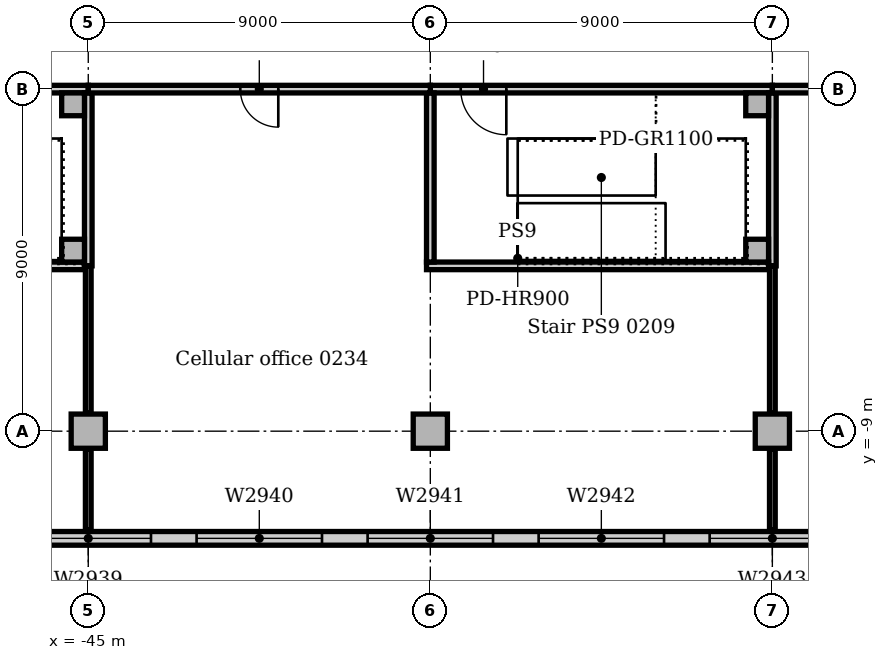
"""IFC4 building model, lengths in metres.
Left out: names, types, materials, properties, quantities, classifications, styles, units other than length and angle.
Written with IfcOpenShell. Run it as: python <this file> out.ifc"""

import sys

from ifc_helpers import new_model, si_unit, direction, frame, frame_2d, origin, origin_2d, place, context, subcontext, project, spatial, rectangle, extrude, element, fill, save


model = new_model("IFC4")
c1 = context("Model", 3, precision=1e-05, world=origin(), true_north=direction((0.0, 1.0)))
c2 = subcontext(c1, "Body", "Model", "MODEL_VIEW")
j1 = project(units=[si_unit("LENGTHUNIT", "METRE"), si_unit("PLANEANGLEUNIT", "RADIAN")], contexts=[c1])
p1 = place(None, origin())
s1 = spatial("IfcSite", under=j1, at=p1, CompositionType="ELEMENT")
p2 = place(p1, origin())
s2 = spatial("IfcBuilding", under=s1, at=p2, CompositionType="ELEMENT")
p3 = place(p2, frame((0.0, 0.0, 11.0)))
s3 = spatial("IfcBuildingStorey", under=s2, at=p3, CompositionType="ELEMENT", Elevation=11.0)
for number, where, z_axis, x_axis in (
    (1, (-45.0, -9.0, 0.0), (0.0, 0.0, 1.0), (1.0, 0.0, 0.0)),
    (2, (-36.0, -9.0, 0.0), (0.0, 0.0, 1.0), (1.0, 0.0, 0.0)),
    (3, (-27.0, -9.0, 0.0), (0.0, 0.0, 1.0), (1.0, 0.0, 0.0)),
):
    element("IfcColumn", number, at=place(p3, frame(where, z_axis=z_axis, x_axis=x_axis)), inside=s3, PredefinedType="COLUMN", context=c2, shape_type="SweptSolid", body=[
        extrude(rectangle(XDim=0.9, YDim=0.9, at=origin_2d()), origin(), (0.0, 0.0, 1.0), 4.7),
    ])
p4 = place(p3, frame((-81.0, -11.82, 0.0), z_axis=(0.0, 0.0, 1.0), x_axis=(1.0, 0.0, 0.0)))
e4 = element("IfcWall", 4, at=p4, inside=s3, PredefinedType="STANDARD", context=c2, shape_type="SweptSolid", body=[
    extrude(rectangle(XDim=144.0, YDim=0.36, at=frame_2d((72.0, 0.0))), origin(), (0.0, 0.0, 1.0), 4.7),
])
p5 = place(p4, frame((2.85, 0.0, 0.9)))
e5 = element("IfcOpeningElement", 5, at=p5, cuts=e4, PredefinedType="OPENING", context=c2, shape_type="SweptSolid", body=[
    extrude(rectangle(XDim=3.3, YDim=2.4, at=frame_2d((1.65, 1.2))), frame((0.0, 0.19, 0.0), z_axis=(0.0, -1.0, 0.0), x_axis=(1.0, 0.0, 0.0)), (0.0, 0.0, 1.0), 0.38),
])
p6 = place(p4, frame((7.35, 0.0, 0.9)))
e6 = element("IfcOpeningElement", 6, at=p6, cuts=e4, PredefinedType="OPENING", context=c2, shape_type="SweptSolid", body=[
    extrude(rectangle(XDim=3.3, YDim=2.4, at=frame_2d((1.65, 1.2))), frame((0.0, 0.19, 0.0), z_axis=(0.0, -1.0, 0.0), x_axis=(1.0, 0.0, 0.0)), (0.0, 0.0, 1.0), 0.38),
])
p7 = place(p4, frame((11.85, 0.0, 0.9)))
e7 = element("IfcOpeningElement", 7, at=p7, cuts=e4, PredefinedType="OPENING", context=c2, shape_type="SweptSolid", body=[
    extrude(rectangle(XDim=3.3, YDim=2.4, at=frame_2d((1.65, 1.2))), frame((0.0, 0.19, 0.0), z_axis=(0.0, -1.0, 0.0), x_axis=(1.0, 0.0, 0.0)), (0.0, 0.0, 1.0), 0.38),
])
p8 = place(p4, frame((16.35, 0.0, 0.9)))
e8 = element("IfcOpeningElement", 8, at=p8, cuts=e4, PredefinedType="OPENING", context=c2, shape_type="SweptSolid", body=[
    extrude(rectangle(XDim=3.3, YDim=2.4, at=frame_2d((1.65, 1.2))), frame((0.0, 0.19, 0.0), z_axis=(0.0, -1.0, 0.0), x_axis=(1.0, 0.0, 0.0)), (0.0, 0.0, 1.0), 0.38),
])
p9 = place(p4, frame((20.85, 0.0, 0.9)))
e9 = element("IfcOpeningElement", 9, at=p9, cuts=e4, PredefinedType="OPENING", context=c2, shape_type="SweptSolid", body=[
    extrude(rectangle(XDim=3.3, YDim=2.4, at=frame_2d((1.65, 1.2))), frame((0.0, 0.19, 0.0), z_axis=(0.0, -1.0, 0.0), x_axis=(1.0, 0.0, 0.0)), (0.0, 0.0, 1.0), 0.38),
])
p10 = place(p4, frame((25.35, 0.0, 0.9)))
e10 = element("IfcOpeningElement", 10, at=p10, cuts=e4, PredefinedType="OPENING", context=c2, shape_type="SweptSolid", body=[
    extrude(rectangle(XDim=3.3, YDim=2.4, at=frame_2d((1.65, 1.2))), frame((0.0, 0.19, 0.0), z_axis=(0.0, -1.0, 0.0), x_axis=(1.0, 0.0, 0.0)), (0.0, 0.0, 1.0), 0.38),
])
p11 = place(p4, frame((29.85, 0.0, 0.9)))
e11 = element("IfcOpeningElement", 11, at=p11, cuts=e4, PredefinedType="OPENING", context=c2, shape_type="SweptSolid", body=[
    extrude(rectangle(XDim=3.3, YDim=2.4, at=frame_2d((1.65, 1.2))), frame((0.0, 0.19, 0.0), z_axis=(0.0, -1.0, 0.0), x_axis=(1.0, 0.0, 0.0)), (0.0, 0.0, 1.0), 0.38),
])
p12 = place(p4, frame((34.35, 0.0, 0.9)))
e12 = element("IfcOpeningElement", 12, at=p12, cuts=e4, PredefinedType="OPENING", context=c2, shape_type="SweptSolid", body=[
    extrude(rectangle(XDim=3.3, YDim=2.4, at=frame_2d((1.65, 1.2))), frame((0.0, 0.19, 0.0), z_axis=(0.0, -1.0, 0.0), x_axis=(1.0, 0.0, 0.0)), (0.0, 0.0, 1.0), 0.38),
])
p13 = place(p4, frame((38.85, 0.0, 0.9)))
e13 = element("IfcOpeningElement", 13, at=p13, cuts=e4, PredefinedType="OPENING", context=c2, shape_type="SweptSolid", body=[
    extrude(rectangle(XDim=3.3, YDim=2.4, at=frame_2d((1.65, 1.2))), frame((0.0, 0.19, 0.0), z_axis=(0.0, -1.0, 0.0), x_axis=(1.0, 0.0, 0.0)), (0.0, 0.0, 1.0), 0.38),
])
p14 = place(p4, frame((43.35, 0.0, 0.9)))
e14 = element("IfcOpeningElement", 14, at=p14, cuts=e4, PredefinedType="OPENING", context=c2, shape_type="SweptSolid", body=[
    extrude(rectangle(XDim=3.3, YDim=2.4, at=frame_2d((1.65, 1.2))), frame((0.0, 0.19, 0.0), z_axis=(0.0, -1.0, 0.0), x_axis=(1.0, 0.0, 0.0)), (0.0, 0.0, 1.0), 0.38),
])
p15 = place(p4, frame((47.85, 0.0, 0.9)))
e15 = element("IfcOpeningElement", 15, at=p15, cuts=e4, PredefinedType="OPENING", context=c2, shape_type="SweptSolid", body=[
    extrude(rectangle(XDim=3.3, YDim=2.4, at=frame_2d((1.65, 1.2))), frame((0.0, 0.19, 0.0), z_axis=(0.0, -1.0, 0.0), x_axis=(1.0, 0.0, 0.0)), (0.0, 0.0, 1.0), 0.38),
])
p16 = place(p4, frame((52.35, 0.0, 0.9)))
e16 = element("IfcOpeningElement", 16, at=p16, cuts=e4, PredefinedType="OPENING", context=c2, shape_type="SweptSolid", body=[
    extrude(rectangle(XDim=3.3, YDim=2.4, at=frame_2d((1.65, 1.2))), frame((0.0, 0.19, 0.0), z_axis=(0.0, -1.0, 0.0), x_axis=(1.0, 0.0, 0.0)), (0.0, 0.0, 1.0), 0.38),
])
p17 = place(p4, frame((56.85, 0.0, 0.9)))
e17 = element("IfcOpeningElement", 17, at=p17, cuts=e4, PredefinedType="OPENING", context=c2, shape_type="SweptSolid", body=[
    extrude(rectangle(XDim=3.3, YDim=2.4, at=frame_2d((1.65, 1.2))), frame((0.0, 0.19, 0.0), z_axis=(0.0, -1.0, 0.0), x_axis=(1.0, 0.0, 0.0)), (0.0, 0.0, 1.0), 0.38),
])
p18 = place(p4, frame((61.35, 0.0, 0.9)))
e18 = element("IfcOpeningElement", 18, at=p18, cuts=e4, PredefinedType="OPENING", context=c2, shape_type="SweptSolid", body=[
    extrude(rectangle(XDim=3.3, YDim=2.4, at=frame_2d((1.65, 1.2))), frame((0.0, 0.19, 0.0), z_axis=(0.0, -1.0, 0.0), x_axis=(1.0, 0.0, 0.0)), (0.0, 0.0, 1.0), 0.38),
])
p19 = place(p4, frame((65.85, 0.0, 0.9)))
e19 = element("IfcOpeningElement", 19, at=p19, cuts=e4, PredefinedType="OPENING", context=c2, shape_type="SweptSolid", body=[
    extrude(rectangle(XDim=3.3, YDim=2.4, at=frame_2d((1.65, 1.2))), frame((0.0, 0.19, 0.0), z_axis=(0.0, -1.0, 0.0), x_axis=(1.0, 0.0, 0.0)), (0.0, 0.0, 1.0), 0.38),
])
p20 = place(p4, frame((70.35, 0.0, 0.9)))
e20 = element("IfcOpeningElement", 20, at=p20, cuts=e4, PredefinedType="OPENING", context=c2, shape_type="SweptSolid", body=[
    extrude(rectangle(XDim=3.3, YDim=2.4, at=frame_2d((1.65, 1.2))), frame((0.0, 0.19, 0.0), z_axis=(0.0, -1.0, 0.0), x_axis=(1.0, 0.0, 0.0)), (0.0, 0.0, 1.0), 0.38),
])
p21 = place(p4, frame((74.85, 0.0, 0.9)))
e21 = element("IfcOpeningElement", 21, at=p21, cuts=e4, PredefinedType="OPENING", context=c2, shape_type="SweptSolid", body=[
    extrude(rectangle(XDim=3.3, YDim=2.4, at=frame_2d((1.65, 1.2))), frame((0.0, 0.19, 0.0), z_axis=(0.0, -1.0, 0.0), x_axis=(1.0, 0.0, 0.0)), (0.0, 0.0, 1.0), 0.38),
])
p22 = place(p4, frame((79.35, 0.0, 0.9)))
e22 = element("IfcOpeningElement", 22, at=p22, cuts=e4, PredefinedType="OPENING", context=c2, shape_type="SweptSolid", body=[
    extrude(rectangle(XDim=3.3, YDim=2.4, at=frame_2d((1.65, 1.2))), frame((0.0, 0.19, 0.0), z_axis=(0.0, -1.0, 0.0), x_axis=(1.0, 0.0, 0.0)), (0.0, 0.0, 1.0), 0.38),
])
p23 = place(p4, frame((83.85, 0.0, 0.9)))
e23 = element("IfcOpeningElement", 23, at=p23, cuts=e4, PredefinedType="OPENING", context=c2, shape_type="SweptSolid", body=[
    extrude(rectangle(XDim=3.3, YDim=2.4, at=frame_2d((1.65, 1.2))), frame((0.0, 0.19, 0.0), z_axis=(0.0, -1.0, 0.0), x_axis=(1.0, 0.0, 0.0)), (0.0, 0.0, 1.0), 0.38),
])
p24 = place(p4, frame((88.35, 0.0, 0.9)))
e24 = element("IfcOpeningElement", 24, at=p24, cuts=e4, PredefinedType="OPENING", context=c2, shape_type="SweptSolid", body=[
    extrude(rectangle(XDim=3.3, YDim=2.4, at=frame_2d((1.65, 1.2))), frame((0.0, 0.19, 0.0), z_axis=(0.0, -1.0, 0.0), x_axis=(1.0, 0.0, 0.0)), (0.0, 0.0, 1.0), 0.38),
])
p25 = place(p4, frame((92.85, 0.0, 0.9)))
e25 = element("IfcOpeningElement", 25, at=p25, cuts=e4, PredefinedType="OPENING", context=c2, shape_type="SweptSolid", body=[
    extrude(rectangle(XDim=3.3, YDim=2.4, at=frame_2d((1.65, 1.2))), frame((0.0, 0.19, 0.0), z_axis=(0.0, -1.0, 0.0), x_axis=(1.0, 0.0, 0.0)), (0.0, 0.0, 1.0), 0.38),
])
p26 = place(p4, frame((97.35, 0.0, 0.9)))
e26 = element("IfcOpeningElement", 26, at=p26, cuts=e4, PredefinedType="OPENING", context=c2, shape_type="SweptSolid", body=[
    extrude(rectangle(XDim=3.3, YDim=2.4, at=frame_2d((1.65, 1.2))), frame((0.0, 0.19, 0.0), z_axis=(0.0, -1.0, 0.0), x_axis=(1.0, 0.0, 0.0)), (0.0, 0.0, 1.0), 0.38),
])
p27 = place(p4, frame((101.85, 0.0, 0.9)))
e27 = element("IfcOpeningElement", 27, at=p27, cuts=e4, PredefinedType="OPENING", context=c2, shape_type="SweptSolid", body=[
    extrude(rectangle(XDim=3.3, YDim=2.4, at=frame_2d((1.65, 1.2))), frame((0.0, 0.19, 0.0), z_axis=(0.0, -1.0, 0.0), x_axis=(1.0, 0.0, 0.0)), (0.0, 0.0, 1.0), 0.38),
])
p28 = place(p4, frame((106.35, 0.0, 0.9)))
e28 = element("IfcOpeningElement", 28, at=p28, cuts=e4, PredefinedType="OPENING", context=c2, shape_type="SweptSolid", body=[
    extrude(rectangle(XDim=3.3, YDim=2.4, at=frame_2d((1.65, 1.2))), frame((0.0, 0.19, 0.0), z_axis=(0.0, -1.0, 0.0), x_axis=(1.0, 0.0, 0.0)), (0.0, 0.0, 1.0), 0.38),
])
p29 = place(p4, frame((110.85, 0.0, 0.9)))
e29 = element("IfcOpeningElement", 29, at=p29, cuts=e4, PredefinedType="OPENING", context=c2, shape_type="SweptSolid", body=[
    extrude(rectangle(XDim=3.3, YDim=2.4, at=frame_2d((1.65, 1.2))), frame((0.0, 0.19, 0.0), z_axis=(0.0, -1.0, 0.0), x_axis=(1.0, 0.0, 0.0)), (0.0, 0.0, 1.0), 0.38),
])
p30 = place(p4, frame((115.35, 0.0, 0.9)))
e30 = element("IfcOpeningElement", 30, at=p30, cuts=e4, PredefinedType="OPENING", context=c2, shape_type="SweptSolid", body=[
    extrude(rectangle(XDim=3.3, YDim=2.4, at=frame_2d((1.65, 1.2))), frame((0.0, 0.19, 0.0), z_axis=(0.0, -1.0, 0.0), x_axis=(1.0, 0.0, 0.0)), (0.0, 0.0, 1.0), 0.38),
])
p31 = place(p4, frame((119.85, 0.0, 0.9)))
e31 = element("IfcOpeningElement", 31, at=p31, cuts=e4, PredefinedType="OPENING", context=c2, shape_type="SweptSolid", body=[
    extrude(rectangle(XDim=3.3, YDim=2.4, at=frame_2d((1.65, 1.2))), frame((0.0, 0.19, 0.0), z_axis=(0.0, -1.0, 0.0), x_axis=(1.0, 0.0, 0.0)), (0.0, 0.0, 1.0), 0.38),
])
p32 = place(p4, frame((124.35, 0.0, 0.9)))
e32 = element("IfcOpeningElement", 32, at=p32, cuts=e4, PredefinedType="OPENING", context=c2, shape_type="SweptSolid", body=[
    extrude(rectangle(XDim=3.3, YDim=2.4, at=frame_2d((1.65, 1.2))), frame((0.0, 0.19, 0.0), z_axis=(0.0, -1.0, 0.0), x_axis=(1.0, 0.0, 0.0)), (0.0, 0.0, 1.0), 0.38),
])
p33 = place(p4, frame((128.85, 0.0, 0.9)))
e33 = element("IfcOpeningElement", 33, at=p33, cuts=e4, PredefinedType="OPENING", context=c2, shape_type="SweptSolid", body=[
    extrude(rectangle(XDim=3.3, YDim=2.4, at=frame_2d((1.65, 1.2))), frame((0.0, 0.19, 0.0), z_axis=(0.0, -1.0, 0.0), x_axis=(1.0, 0.0, 0.0)), (0.0, 0.0, 1.0), 0.38),
])
p34 = place(p4, frame((133.35, 0.0, 0.9)))
e34 = element("IfcOpeningElement", 34, at=p34, cuts=e4, PredefinedType="OPENING", context=c2, shape_type="SweptSolid", body=[
    extrude(rectangle(XDim=3.3, YDim=2.4, at=frame_2d((1.65, 1.2))), frame((0.0, 0.19, 0.0), z_axis=(0.0, -1.0, 0.0), x_axis=(1.0, 0.0, 0.0)), (0.0, 0.0, 1.0), 0.38),
])
p35 = place(p4, frame((137.85, 0.0, 0.9)))
e35 = element("IfcOpeningElement", 35, at=p35, cuts=e4, PredefinedType="OPENING", context=c2, shape_type="SweptSolid", body=[
    extrude(rectangle(XDim=3.3, YDim=2.4, at=frame_2d((1.65, 1.2))), frame((0.0, 0.19, 0.0), z_axis=(0.0, -1.0, 0.0), x_axis=(1.0, 0.0, 0.0)), (0.0, 0.0, 1.0), 0.38),
])
for number, where, z_axis, x_axis in (
    (36, (-45.4, -4.25, 0.0), (0.0, 0.0, 1.0), (1.0, 0.0, 0.0)),
    (37, (-45.4, -0.4, 0.0), (0.0, 0.0, 1.0), (1.0, 0.0, 0.0)),
    (38, (-27.4, -4.25, 0.0), (0.0, 0.0, 1.0), (1.0, 0.0, 0.0)),
    (39, (-27.4, -0.4, 0.0), (0.0, 0.0, 1.0), (1.0, 0.0, 0.0)),
):
    element("IfcColumn", number, at=place(p3, frame(where, z_axis=z_axis, x_axis=x_axis)), inside=s3, PredefinedType="COLUMN", context=c2, shape_type="SweptSolid", body=[
        extrude(rectangle(XDim=0.6, YDim=0.6, at=origin_2d()), origin(), (0.0, 0.0, 1.0), 5.0),
    ])
p36 = place(p3, frame((-54.0, 0.0, 0.0), z_axis=(0.0, 0.0, 1.0), x_axis=(1.0, 0.0, 0.0)))
e40 = element("IfcWall", 40, at=p36, inside=s3, PredefinedType="SOLIDWALL", context=c2, shape_type="SweptSolid", body=[
    extrude(rectangle(XDim=9.0, YDim=0.2, at=frame_2d((4.5, 0.0))), origin(), (0.0, 0.0, 1.0), 4.7),
])
p37 = place(p36, frame((0.8, 0.0, 0.0)))
e41 = element("IfcOpeningElement", 41, at=p37, cuts=e40, PredefinedType="OPENING", context=c2, shape_type="SweptSolid", body=[
    extrude(rectangle(XDim=1.2, YDim=2.1, at=frame_2d((0.6, 1.05))), frame((0.0, 0.11, 0.0), z_axis=(0.0, -1.0, 0.0), x_axis=(1.0, 0.0, 0.0)), (0.0, 0.0, 1.0), 0.22),
])
p38 = place(p3, frame((-54.1, -4.65, 0.0), z_axis=(0.0, 0.0, 1.0), x_axis=(1.0, 0.0, 0.0)))
e42 = element("IfcWall", 42, at=p38, inside=s3, PredefinedType="SOLIDWALL", context=c2, shape_type="SweptSolid", body=[
    extrude(rectangle(XDim=9.0, YDim=0.2, at=frame_2d((4.5, 0.0))), origin(), (0.0, 0.0, 1.0), 4.7),
])
p39 = place(p3, frame((-45.0, -4.65, 0.0), z_axis=(0.0, 0.0, 1.0), x_axis=(0.0, 1.0, 0.0)))
e43 = element("IfcWall", 43, at=p39, inside=s3, PredefinedType="SOLIDWALL", context=c2, shape_type="SweptSolid", body=[
    extrude(rectangle(XDim=4.55, YDim=0.2, at=frame_2d((2.275, 0.0))), origin(), (0.0, 0.0, 1.0), 4.7),
])
p40 = place(p3, frame((-36.0, 0.0, 0.0), z_axis=(0.0, 0.0, 1.0), x_axis=(1.0, 0.0, 0.0)))
e44 = element("IfcWall", 44, at=p40, inside=s3, PredefinedType="SOLIDWALL", context=c2, shape_type="SweptSolid", body=[
    extrude(rectangle(XDim=9.0, YDim=0.2, at=frame_2d((4.5, 0.0))), origin(), (0.0, 0.0, 1.0), 4.7),
])
p41 = place(p40, frame((0.8, 0.0, 0.0)))
e45 = element("IfcOpeningElement", 45, at=p41, cuts=e44, PredefinedType="OPENING", context=c2, shape_type="SweptSolid", body=[
    extrude(rectangle(XDim=1.2, YDim=2.1, at=frame_2d((0.6, 1.05))), frame((0.0, 0.11, 0.0), z_axis=(0.0, -1.0, 0.0), x_axis=(1.0, 0.0, 0.0)), (0.0, 0.0, 1.0), 0.22),
])
p42 = place(p3, frame((-27.0, -4.65, 0.0), z_axis=(0.0, 0.0, 1.0), x_axis=(0.0, 1.0, 0.0)))
e46 = element("IfcWall", 46, at=p42, inside=s3, PredefinedType="SOLIDWALL", context=c2, shape_type="SweptSolid", body=[
    extrude(rectangle(XDim=4.55, YDim=0.2, at=frame_2d((2.275, 0.0))), origin(), (0.0, 0.0, 1.0), 4.7),
])
p43 = place(p3, frame((-36.1, -4.65, 0.0), z_axis=(0.0, 0.0, 1.0), x_axis=(1.0, 0.0, 0.0)))
e47 = element("IfcWall", 47, at=p43, inside=s3, PredefinedType="SOLIDWALL", context=c2, shape_type="SweptSolid", body=[
    extrude(rectangle(XDim=9.0, YDim=0.2, at=frame_2d((4.5, 0.0))), origin(), (0.0, 0.0, 1.0), 4.7),
])
p44 = place(p3, frame((-36.0, -4.55, 0.0), z_axis=(0.0, 0.0, 1.0), x_axis=(0.0, 1.0, 0.0)))
e48 = element("IfcWall", 48, at=p44, inside=s3, PredefinedType="SOLIDWALL", context=c2, shape_type="SweptSolid", body=[
    extrude(rectangle(XDim=4.45, YDim=0.2, at=frame_2d((2.225, 0.0))), origin(), (0.0, 0.0, 1.0), 4.7),
])
p45 = place(p3, frame((-45.0, 0.0, 0.0), z_axis=(0.0, 0.0, 1.0), x_axis=(1.0, 0.0, 0.0)))
e49 = element("IfcWall", 49, at=p45, inside=s3, PredefinedType="PARTITIONING", context=c2, shape_type="SweptSolid", body=[
    extrude(rectangle(XDim=9.0, YDim=0.2, at=frame_2d((4.5, 0.0))), origin(), (0.0, 0.0, 1.0), 4.7),
])
p46 = place(p45, frame((4.0, 0.0, 0.0)))
e50 = element("IfcOpeningElement", 50, at=p46, cuts=e49, PredefinedType="OPENING", context=c2, shape_type="SweptSolid", body=[
    extrude(rectangle(XDim=1.0, YDim=2.1, at=frame_2d((0.5, 1.05))), frame((0.0, 0.11, 0.0), z_axis=(0.0, -1.0, 0.0), x_axis=(1.0, 0.0, 0.0)), (0.0, 0.0, 1.0), 0.22),
])
p47 = place(p3, frame((-27.0, 0.0, 0.0), z_axis=(0.0, 0.0, 1.0), x_axis=(1.0, 0.0, 0.0)))
e51 = element("IfcWall", 51, at=p47, inside=s3, PredefinedType="PARTITIONING", context=c2, shape_type="SweptSolid", body=[
    extrude(rectangle(XDim=8.53, YDim=0.2, at=frame_2d((4.265, 0.0))), origin(), (0.0, 0.0, 1.0), 4.7),
])
p48 = place(p47, frame((4.0, 0.0, 0.0)))
e52 = element("IfcOpeningElement", 52, at=p48, cuts=e51, PredefinedType="OPENING", context=c2, shape_type="SweptSolid", body=[
    extrude(rectangle(XDim=1.0, YDim=2.1, at=frame_2d((0.5, 1.05))), frame((0.0, 0.11, 0.0), z_axis=(0.0, -1.0, 0.0), x_axis=(1.0, 0.0, 0.0)), (0.0, 0.0, 1.0), 0.22),
])
p49 = place(p3, frame((-27.0, -11.6, 0.0), z_axis=(0.0, 0.0, 1.0), x_axis=(0.0, 1.0, 0.0)))
e53 = element("IfcWall", 53, at=p49, inside=s3, PredefinedType="PARTITIONING", context=c2, shape_type="SweptSolid", body=[
    extrude(rectangle(XDim=2.13, YDim=0.15, at=frame_2d((1.065, 0.0))), origin(), (0.0, 0.0, 1.0), 4.7),
])
p50 = place(p3, frame((-27.0, -8.53, 0.0), z_axis=(0.0, 0.0, 1.0), x_axis=(0.0, 1.0, 0.0)))
e54 = element("IfcWall", 54, at=p50, inside=s3, PredefinedType="PARTITIONING", context=c2, shape_type="SweptSolid", body=[
    extrude(rectangle(XDim=3.88, YDim=0.15, at=frame_2d((1.94, 0.0))), origin(), (0.0, 0.0, 1.0), 4.7),
])
p51 = place(p3, frame((-45.0, -11.6, 0.0), z_axis=(0.0, 0.0, 1.0), x_axis=(0.0, 1.0, 0.0)))
e55 = element("IfcWall", 55, at=p51, inside=s3, PredefinedType="PARTITIONING", context=c2, shape_type="SweptSolid", body=[
    extrude(rectangle(XDim=2.13, YDim=0.15, at=frame_2d((1.065, 0.0))), origin(), (0.0, 0.0, 1.0), 4.7),
])
p52 = place(p3, frame((-45.0, -8.53, 0.0), z_axis=(0.0, 0.0, 1.0), x_axis=(0.0, 1.0, 0.0)))
e56 = element("IfcWall", 56, at=p52, inside=s3, PredefinedType="PARTITIONING", context=c2, shape_type="SweptSolid", body=[
    extrude(rectangle(XDim=3.88, YDim=0.15, at=frame_2d((1.94, 0.0))), origin(), (0.0, 0.0, 1.0), 4.7),
])
p53 = place(p12, origin())
e57 = element("IfcWindow", 57, at=p53, inside=s3, PartitioningType="SINGLE_PANEL", PredefinedType="WINDOW", context=c2, shape_type="SweptSolid", body=[
    extrude(rectangle(XDim=3.3, YDim=2.4, at=frame_2d((1.65, 1.2))), frame((0.0, 0.13, 0.0), z_axis=(0.0, -1.0, 0.0), x_axis=(1.0, 0.0, 0.0)), (0.0, 0.0, 1.0), 0.06),
])
fill(e12, e57)
p54 = place(p13, origin())
e58 = element("IfcWindow", 58, at=p54, inside=s3, PartitioningType="SINGLE_PANEL", PredefinedType="WINDOW", context=c2, shape_type="SweptSolid", body=[
    extrude(rectangle(XDim=3.3, YDim=2.4, at=frame_2d((1.65, 1.2))), frame((0.0, 0.13, 0.0), z_axis=(0.0, -1.0, 0.0), x_axis=(1.0, 0.0, 0.0)), (0.0, 0.0, 1.0), 0.06),
])
fill(e13, e58)
p55 = place(p14, origin())
e59 = element("IfcWindow", 59, at=p55, inside=s3, PartitioningType="SINGLE_PANEL", PredefinedType="WINDOW", context=c2, shape_type="SweptSolid", body=[
    extrude(rectangle(XDim=3.3, YDim=2.4, at=frame_2d((1.65, 1.2))), frame((0.0, 0.13, 0.0), z_axis=(0.0, -1.0, 0.0), x_axis=(1.0, 0.0, 0.0)), (0.0, 0.0, 1.0), 0.06),
])
fill(e14, e59)
p56 = place(p15, origin())
e60 = element("IfcWindow", 60, at=p56, inside=s3, PartitioningType="SINGLE_PANEL", PredefinedType="WINDOW", context=c2, shape_type="SweptSolid", body=[
    extrude(rectangle(XDim=3.3, YDim=2.4, at=frame_2d((1.65, 1.2))), frame((0.0, 0.13, 0.0), z_axis=(0.0, -1.0, 0.0), x_axis=(1.0, 0.0, 0.0)), (0.0, 0.0, 1.0), 0.06),
])
fill(e15, e60)
p57 = place(p16, origin())
e61 = element("IfcWindow", 61, at=p57, inside=s3, PartitioningType="SINGLE_PANEL", PredefinedType="WINDOW", context=c2, shape_type="SweptSolid", body=[
    extrude(rectangle(XDim=3.3, YDim=2.4, at=frame_2d((1.65, 1.2))), frame((0.0, 0.13, 0.0), z_axis=(0.0, -1.0, 0.0), x_axis=(1.0, 0.0, 0.0)), (0.0, 0.0, 1.0), 0.06),
])
fill(e16, e61)
p58 = place(p46, frame((1.0, 0.0, 0.0), z_axis=(0.0, 0.0, 1.0), x_axis=(-1.0, 0.0, 0.0)))
e62 = element("IfcDoor", 62, at=p58, inside=s3, OperationType="SINGLE_SWING_LEFT", PredefinedType="DOOR", context=c2, shape_type="SweptSolid", body=[
    extrude(rectangle(XDim=1.0, YDim=2.1, at=frame_2d((0.5, 1.05))), frame((0.0, 0.025, 0.0), z_axis=(0.0, -1.0, 0.0), x_axis=(1.0, 0.0, 0.0)), (0.0, 0.0, 1.0), 0.05),
])
fill(e50, e62)
p59 = place(p41, frame((1.2, 0.0, 0.0), z_axis=(0.0, 0.0, 1.0), x_axis=(-1.0, 0.0, 0.0)))
e63 = element("IfcDoor", 63, at=p59, inside=s3, OperationType="SINGLE_SWING_LEFT", PredefinedType="DOOR", context=c2, shape_type="SweptSolid", body=[
    extrude(rectangle(XDim=1.2, YDim=2.1, at=frame_2d((0.6, 1.05))), frame((0.0, 0.025, 0.0), z_axis=(0.0, -1.0, 0.0), x_axis=(1.0, 0.0, 0.0)), (0.0, 0.0, 1.0), 0.05),
])
fill(e45, e63)
save(model, sys.argv[1])
